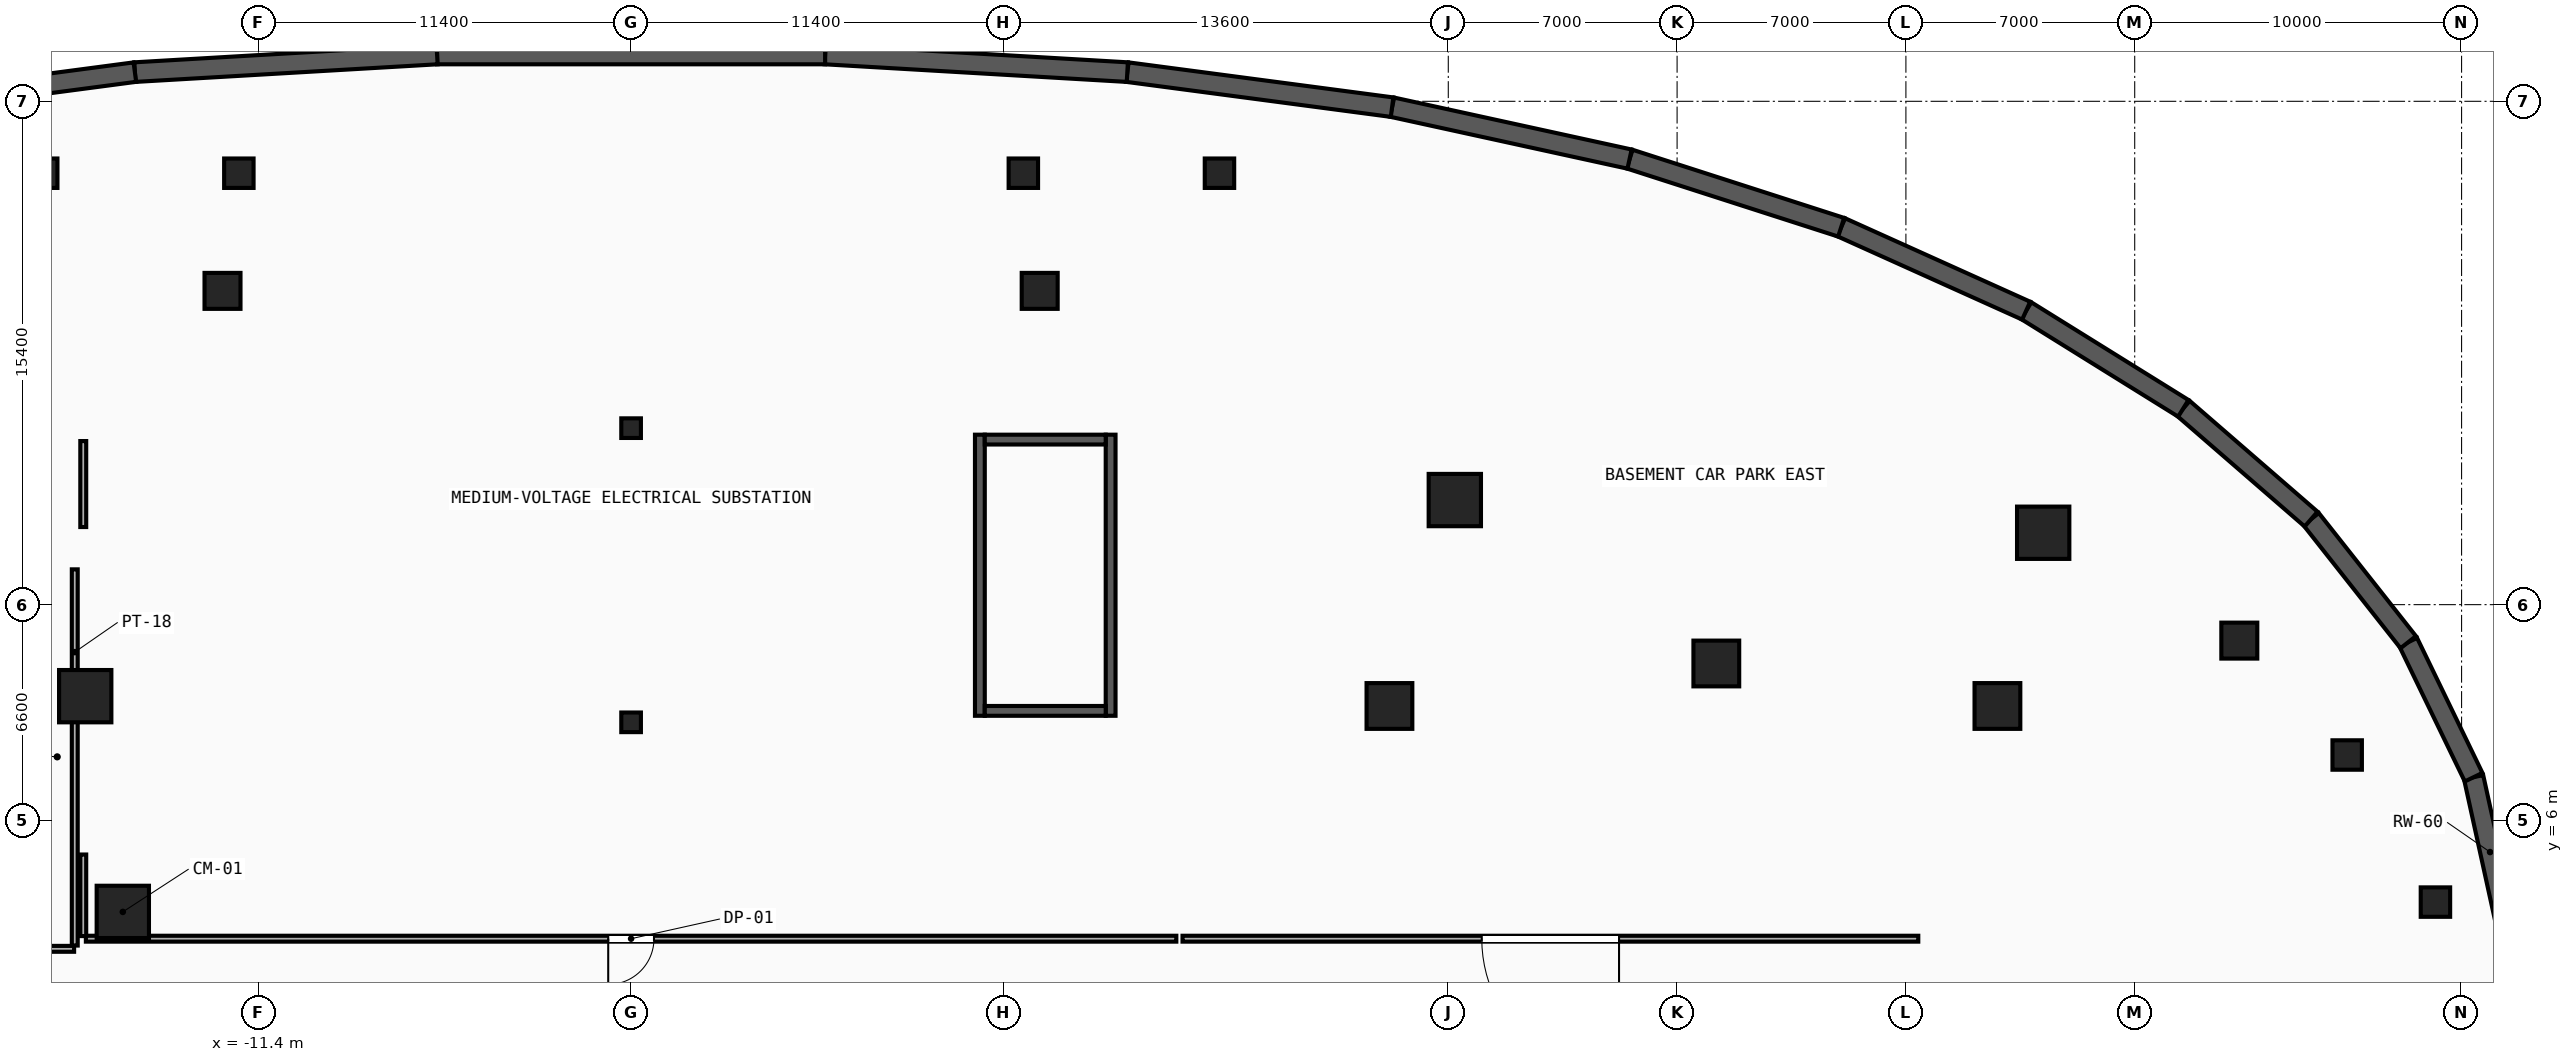
"""IFC4 building model, lengths in metres.
Left out: names, types, materials, properties, quantities, classifications, styles, units other than length and angle.
Written with IfcOpenShell. Run it as: python <this file> out.ifc"""

import sys

from ifc_helpers import new_model, si_unit, direction, frame, frame_2d, origin, origin_2d, place, context, subcontext, project, spatial, rectangle, hollow_rectangle, circle, extrude, element, fill, save


model = new_model("IFC4")
c1 = context("Model", 3, precision=1e-05, world=origin(), true_north=direction((0.0, 1.0)))
c2 = subcontext(c1, "Body", "Model", "MODEL_VIEW")
j1 = project(units=[si_unit("LENGTHUNIT", "METRE"), si_unit("PLANEANGLEUNIT", "RADIAN")], contexts=[c1])
p1 = place(None, origin())
s1 = spatial("IfcSite", under=j1, at=p1, CompositionType="ELEMENT")
p2 = place(p1, origin())
s2 = spatial("IfcBuilding", under=s1, at=p2, CompositionType="ELEMENT")
p3 = place(p2, frame((0.0, 0.0, -4.5)))
s3 = spatial("IfcBuildingStorey", under=s2, at=p3, CompositionType="ELEMENT", Elevation=-4.5)
for number, where, z_axis, x_axis in (
    (1, (41.8, 9.5, 0.0), (0.0, 0.0, 1.0), (1.0, 0.0, 0.0)),
    (2, (33.2, 10.8, 0.0), (0.0, 0.0, 1.0), (1.0, 0.0, 0.0)),
    (3, (23.2, 9.5, 0.0), (0.0, 0.0, 1.0), (1.0, 0.0, 0.0)),
):
    element("IfcColumn", number, at=place(p3, frame(where, z_axis=z_axis, x_axis=x_axis)), inside=s3, PredefinedType="COLUMN", context=c2, shape_type="SweptSolid", body=[
        extrude(rectangle(XDim=1.4, YDim=1.4, at=origin_2d()), origin(), (0.0, 0.0, 1.0), 4.5),
    ])
for number, where, z_axis, x_axis in (
    (4, (-15.55, 3.2, 0.0), (0.0, 0.0, 1.0), (1.0, 0.0, 0.0)),
    (5, (-16.7, 9.8, 0.0), (0.0, 0.0, 1.0), (1.0, 0.0, 0.0)),
    (6, (43.2, 14.8, 0.0), (0.0, 0.0, 1.0), (1.0, 0.0, 0.0)),
    (7, (25.2, 15.8, 0.0), (0.0, 0.0, 1.0), (1.0, 0.0, 0.0)),
):
    element("IfcColumn", number, at=place(p3, frame(where, z_axis=z_axis, x_axis=x_axis)), inside=s3, PredefinedType="COLUMN", context=c2, shape_type="SweptSolid", body=[
        extrude(rectangle(XDim=1.6, YDim=1.6, at=origin_2d()), origin(), (0.0, 0.0, 1.0), 4.5),
    ])
for number, where, z_axis, x_axis in (
    (8, (0.0, 9.0, 0.0), (0.0, 0.0, 1.0), (1.0, 0.0, 0.0)),
    (9, (0.0, 18.0, 0.0), (0.0, 0.0, 1.0), (1.0, 0.0, 0.0)),
):
    element("IfcColumn", number, at=place(p3, frame(where, z_axis=z_axis, x_axis=x_axis)), inside=s3, PredefinedType="COLUMN", context=c2, shape_type="SweptSolid", body=[
        extrude(hollow_rectangle(XDim=0.6, YDim=0.6, WallThickness=0.032, at=origin_2d()), origin(), (0.0, 0.0, 1.0), 4.5),
    ])
for number, where, z_axis, x_axis in (
    (10, (-12.5, 22.2, 0.0), (0.0, 0.0, 1.0), (1.0, 0.0, 0.0)),
    (11, (12.5, 22.2, 0.0), (0.0, 0.0, 1.0), (1.0, 0.0, 0.0)),
    (12, (49.2, 11.5, 0.0), (0.0, 0.0, 1.0), (1.0, 0.0, 0.0)),
):
    element("IfcColumn", number, at=place(p3, frame(where, z_axis=z_axis, x_axis=x_axis)), inside=s3, PredefinedType="PILASTER", context=c2, shape_type="SweptSolid", body=[
        extrude(circle(Radius=0.55, at=origin_2d()), origin(), (0.0, 0.0, 1.0), 4.5),
    ])
for number, where, z_axis, x_axis in (
    (13, (52.5, 8.0, 0.0), (0.0, 0.0, 1.0), (1.0, 0.0, 0.0)),
    (14, (55.2, 3.5, 0.0), (0.0, 0.0, 1.0), (1.0, 0.0, 0.0)),
    (15, (-18.0, 25.8, 0.0), (0.0, 0.0, 1.0), (1.0, 0.0, 0.0)),
    (16, (-12.0, 25.8, 0.0), (0.0, 0.0, 1.0), (1.0, 0.0, 0.0)),
    (17, (12.0, 25.8, 0.0), (0.0, 0.0, 1.0), (1.0, 0.0, 0.0)),
    (18, (18.0, 25.8, 0.0), (0.0, 0.0, 1.0), (1.0, 0.0, 0.0)),
):
    element("IfcColumn", number, at=place(p3, frame(where, z_axis=z_axis, x_axis=x_axis)), inside=s3, PredefinedType="COLUMN", context=c2, shape_type="SweptSolid", body=[
        extrude(rectangle(XDim=0.9, YDim=0.9, at=origin_2d()), origin(), (0.0, 0.0, 1.0), 4.5),
    ])
p4 = place(p3, frame((57.374, 2.74, 0.0), z_axis=(0.0, 0.0, 1.0), x_axis=(-0.214510247434, 0.976721738135, 0.0)))
e19 = element("IfcWall", 19, at=p4, inside=s3, PredefinedType="USERDEFINED", context=c2, shape_type="SweptSolid", body=[
    extrude(rectangle(XDim=4.69, YDim=0.6, at=frame_2d((2.345, 0.0))), origin(), (0.0, 0.0, 1.0), 4.15),
])
p5 = place(p3, frame((56.368, 7.321, 0.0), z_axis=(0.0, 0.0, 1.0), x_axis=(-0.435772260249, 0.900056963307, 0.0)))
e20 = element("IfcWall", 20, at=p5, inside=s3, PredefinedType="USERDEFINED", context=c2, shape_type="SweptSolid", body=[
    extrude(rectangle(XDim=4.59, YDim=0.6, at=frame_2d((2.295, 0.0))), origin(), (0.0, 0.0, 1.0), 4.15),
])
p6 = place(p3, frame((54.368, 11.452, 0.0), z_axis=(0.0, 0.0, 1.0), x_axis=(-0.619447864054, 0.785037797637, 0.0)))
e21 = element("IfcWall", 21, at=p6, inside=s3, PredefinedType="USERDEFINED", context=c2, shape_type="SweptSolid", body=[
    extrude(rectangle(XDim=4.796, YDim=0.6, at=frame_2d((2.398, 0.0))), origin(), (0.0, 0.0, 1.0), 4.15),
])
p7 = place(p3, frame((51.397, 15.217, 0.0), z_axis=(0.0, 0.0, 1.0), x_axis=(-0.755564536906, 0.655074217605, 0.0)))
e22 = element("IfcWall", 22, at=p7, inside=s3, PredefinedType="USERDEFINED", context=c2, shape_type="SweptSolid", body=[
    extrude(rectangle(XDim=5.175, YDim=0.6, at=frame_2d((2.587, 0.0))), origin(), (0.0, 0.0, 1.0), 4.15),
])
p8 = place(p3, frame((47.487, 18.607, 0.0), z_axis=(0.0, 0.0, 1.0), x_axis=(-0.849299437699, 0.527911417877, 0.0)))
e23 = element("IfcWall", 23, at=p8, inside=s3, PredefinedType="USERDEFINED", context=c2, shape_type="SweptSolid", body=[
    extrude(rectangle(XDim=5.66, YDim=0.6, at=frame_2d((2.83, 0.0))), origin(), (0.0, 0.0, 1.0), 4.15),
])
p9 = place(p3, frame((42.68, 21.595, 0.0), z_axis=(0.0, 0.0, 1.0), x_axis=(-0.911643952457, 0.410980904603, 0.0)))
e24 = element("IfcWall", 24, at=p9, inside=s3, PredefinedType="USERDEFINED", context=c2, shape_type="SweptSolid", body=[
    extrude(rectangle(XDim=6.209, YDim=0.6, at=frame_2d((3.105, 0.0))), origin(), (0.0, 0.0, 1.0), 4.15),
])
p10 = place(p3, frame((37.019, 24.147, 0.0), z_axis=(0.0, 0.0, 1.0), x_axis=(-0.951843868052, 0.306583187492, 0.0)))
e25 = element("IfcWall", 25, at=p10, inside=s3, PredefinedType="USERDEFINED", context=c2, shape_type="SweptSolid", body=[
    extrude(rectangle(XDim=6.801, YDim=0.6, at=frame_2d((3.4, 0.0))), origin(), (0.0, 0.0, 1.0), 4.15),
])
p11 = place(p3, frame((30.546, 26.232, 0.0), z_axis=(0.0, 0.0, 1.0), x_axis=(-0.976902373216, 0.213686109059, 0.0)))
e26 = element("IfcWall", 26, at=p11, inside=s3, PredefinedType="USERDEFINED", context=c2, shape_type="SweptSolid", body=[
    extrude(rectangle(XDim=7.437, YDim=0.6, at=frame_2d((3.718, 0.0))), origin(), (0.0, 0.0, 1.0), 4.15),
])
p12 = place(p3, frame((23.281, 27.821, 0.0), z_axis=(0.0, 0.0, 1.0), x_axis=(-0.991355566156, 0.131202673187, 0.0)))
e27 = element("IfcWall", 27, at=p12, inside=s3, PredefinedType="USERDEFINED", context=c2, shape_type="SweptSolid", body=[
    extrude(rectangle(XDim=8.171, YDim=0.6, at=frame_2d((4.085, 0.0))), origin(), (0.0, 0.0, 1.0), 4.15),
])
p13 = place(p3, frame((15.181, 28.893, 0.0), z_axis=(0.0, 0.0, 1.0), x_axis=(-0.998305864477, 0.058184198455, 0.0)))
e28 = element("IfcWall", 28, at=p13, inside=s3, PredefinedType="USERDEFINED", context=c2, shape_type="SweptSolid", body=[
    extrude(rectangle(XDim=9.26, YDim=0.6, at=frame_2d((4.63, 0.0))), origin(), (0.0, 0.0, 1.0), 4.15),
])
p14 = place(p3, frame((5.936, 29.432, 0.0), z_axis=(0.0, 0.0, 1.0), x_axis=(-1.0, 0.0, 0.0)))
e29 = element("IfcWall", 29, at=p14, inside=s3, PredefinedType="USERDEFINED", context=c2, shape_type="SweptSolid", body=[
    extrude(rectangle(XDim=11.872, YDim=0.6, at=frame_2d((5.936, 0.0))), origin(), (0.0, 0.0, 1.0), 4.15),
])
p15 = place(p3, frame((-5.936, 29.432, 0.0), z_axis=(0.0, 0.0, 1.0), x_axis=(-0.998305864477, -0.058184198455, 0.0)))
e30 = element("IfcWall", 30, at=p15, inside=s3, PredefinedType="USERDEFINED", context=c2, shape_type="SweptSolid", body=[
    extrude(rectangle(XDim=9.26, YDim=0.6, at=frame_2d((4.63, 0.0))), origin(), (0.0, 0.0, 1.0), 4.15),
])
p16 = place(p3, frame((-15.181, 28.893, 0.0), z_axis=(0.0, 0.0, 1.0), x_axis=(-0.991355566156, -0.131202673187, 0.0)))
e31 = element("IfcWall", 31, at=p16, inside=s3, PredefinedType="USERDEFINED", context=c2, shape_type="SweptSolid", body=[
    extrude(rectangle(XDim=8.171, YDim=0.6, at=frame_2d((4.085, 0.0))), origin(), (0.0, 0.0, 1.0), 4.15),
])
for number, where, z_axis, x_axis in (
    (32, (10.67, 9.2, 0.0), (0.0, 0.0, 1.0), (0.0, 1.0, 0.0)),
    (33, (14.67, 9.2, 0.0), (0.0, 0.0, 1.0), (0.0, 1.0, 0.0)),
):
    element("IfcWall", number, at=place(p3, frame(where, z_axis=z_axis, x_axis=x_axis)), inside=s3, PredefinedType="SHEAR", context=c2, shape_type="SweptSolid", body=[
        extrude(rectangle(XDim=8.6, YDim=0.3, at=frame_2d((4.3, 0.0))), origin(), (0.0, 0.0, 1.0), 4.15),
    ])
for number, where, z_axis, x_axis in (
    (34, (10.82, 17.65, 0.0), (0.0, 0.0, 1.0), (1.0, 0.0, 0.0)),
    (35, (10.82, 9.35, 0.0), (0.0, 0.0, 1.0), (1.0, 0.0, 0.0)),
):
    element("IfcWall", number, at=place(p3, frame(where, z_axis=z_axis, x_axis=x_axis)), inside=s3, PredefinedType="SHEAR", context=c2, shape_type="SweptSolid", body=[
        extrude(rectangle(XDim=3.7, YDim=0.3, at=frame_2d((1.85, 0.0))), origin(), (0.0, 0.0, 1.0), 4.15),
    ])
p17 = place(p3, frame((-17.02, 2.17, 0.0), z_axis=(0.0, 0.0, 1.0), x_axis=(0.0, 1.0, 0.0)))
e36 = element("IfcWall", 36, at=p17, inside=s3, PredefinedType="PARTITIONING", context=c2, shape_type="SweptSolid", body=[
    extrude(rectangle(XDim=11.51, YDim=0.18, at=frame_2d((5.755, 0.0))), origin(), (0.0, 0.0, 1.0), 4.15),
])
p18 = place(p3, frame((-20.87, 2.07, 0.0), z_axis=(0.0, 0.0, 1.0), x_axis=(1.0, 0.0, 0.0)))
e37 = element("IfcWall", 37, at=p18, inside=s3, PredefinedType="PARTITIONING", context=c2, shape_type="SweptSolid", body=[
    extrude(rectangle(XDim=3.83, YDim=0.18, at=frame_2d((1.915, 0.0))), origin(), (0.0, 0.0, 1.0), 4.15),
])
p19 = place(p18, frame((1.44, 0.0, 0.0)))
e38 = element("IfcOpeningElement", 38, at=p19, cuts=e37, PredefinedType="OPENING", context=c2, shape_type="SweptSolid", body=[
    extrude(rectangle(XDim=0.95, YDim=2.1, at=frame_2d((0.475, 1.05))), frame((0.0, 0.1, 0.0), z_axis=(0.0, -1.0, 0.0), x_axis=(1.0, 0.0, 0.0)), (0.0, 0.0, 1.0), 0.2),
])
p20 = place(p3, frame((16.68, 2.38, 0.0), z_axis=(0.0, 0.0, 1.0), x_axis=(-1.0, 0.0, 0.0)))
e39 = element("IfcWall", 39, at=p20, inside=s3, PredefinedType="PARTITIONING", context=c2, shape_type="SweptSolid", body=[
    extrude(rectangle(XDim=33.36, YDim=0.18, at=frame_2d((16.68, 0.0))), origin(), (0.0, 0.0, 1.0), 3.377),
])
p21 = place(p20, frame((15.98, 0.0, 0.0)))
e40 = element("IfcOpeningElement", 40, at=p21, cuts=e39, PredefinedType="OPENING", context=c2, shape_type="SweptSolid", body=[
    extrude(rectangle(XDim=1.4, YDim=2.2, at=frame_2d((0.7, 1.1))), frame((0.0, 0.1, 0.0), z_axis=(0.0, -1.0, 0.0), x_axis=(1.0, 0.0, 0.0)), (0.0, 0.0, 1.0), 0.2),
])
p22 = place(p3, frame((-16.76, 14.975, 0.0), z_axis=(0.0, 0.0, 1.0), x_axis=(0.0, 1.0, 0.0)))
e41 = element("IfcWall", 41, at=p22, inside=s3, PredefinedType="PARTITIONING", context=c2, shape_type="SweptSolid", body=[
    extrude(rectangle(XDim=2.631, YDim=0.18, at=frame_2d((1.315, 0.0))), origin(), (0.0, 0.0, 1.0), 4.15),
])
p23 = place(p3, frame((-16.76, 2.46, 0.0), z_axis=(0.0, 0.0, 1.0), x_axis=(0.0, 1.0, 0.0)))
e42 = element("IfcWall", 42, at=p23, inside=s3, PredefinedType="PARTITIONING", context=c2, shape_type="SweptSolid", body=[
    extrude(rectangle(XDim=2.495, YDim=0.18, at=frame_2d((1.248, 0.0))), origin(), (0.0, 0.0, 1.0), 4.15),
])
p24 = place(p3, frame((39.378, 2.38, 0.0), z_axis=(0.0, 0.0, 1.0), x_axis=(-1.0, 0.0, 0.0)))
e43 = element("IfcWall", 43, at=p24, inside=s3, PredefinedType="PARTITIONING", context=c2, shape_type="SweptSolid", body=[
    extrude(rectangle(XDim=22.508, YDim=0.18, at=frame_2d((11.254, 0.0))), origin(), (0.0, 0.0, 1.0), 4.15),
])
p25 = place(p24, frame((9.154, 0.0, 0.0)))
e44 = element("IfcOpeningElement", 44, at=p25, cuts=e43, PredefinedType="OPENING", context=c2, shape_type="SweptSolid", body=[
    extrude(rectangle(XDim=4.2, YDim=2.8, at=frame_2d((2.1, 1.4))), frame((0.0, 0.1, 0.0), z_axis=(0.0, -1.0, 0.0), x_axis=(1.0, 0.0, 0.0)), (0.0, 0.0, 1.0), 0.2),
])
p26 = place(p21, origin())
e45 = element("IfcDoor", 45, at=p26, inside=s3, OperationType="SINGLE_SWING_RIGHT", PredefinedType="DOOR", context=c2, shape_type="SweptSolid", body=[
    extrude(rectangle(XDim=1.4, YDim=2.2, at=frame_2d((0.7, 1.1))), frame((0.0, 0.025, 0.0), z_axis=(0.0, -1.0, 0.0), x_axis=(1.0, 0.0, 0.0)), (0.0, 0.0, 1.0), 0.05),
])
fill(e40, e45)
p27 = place(p25, origin())
e46 = element("IfcDoor", 46, at=p27, inside=s3, OperationType="SINGLE_SWING_LEFT", PredefinedType="GATE", context=c2, shape_type="SweptSolid", body=[
    extrude(rectangle(XDim=4.2, YDim=2.8, at=frame_2d((2.1, 1.4))), frame((0.0, 0.025, 0.0), z_axis=(0.0, -1.0, 0.0), x_axis=(1.0, 0.0, 0.0)), (0.0, 0.0, 1.0), 0.05),
])
fill(e44, e46)
save(model, sys.argv[1])
